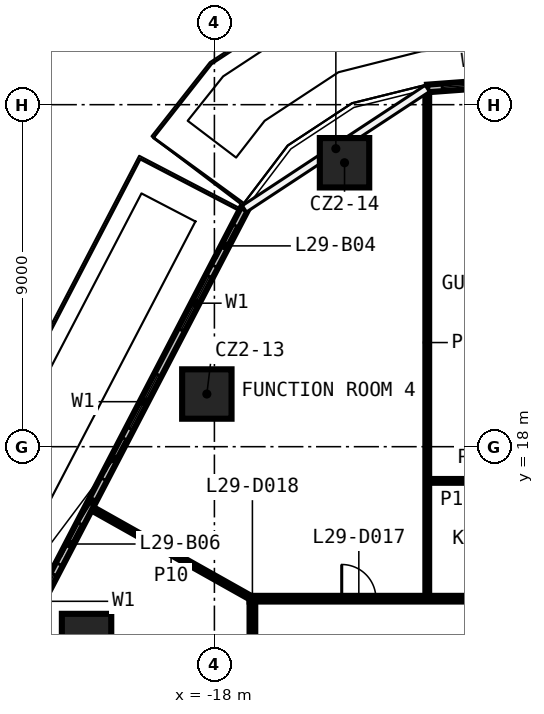
"""IFC4 building model, lengths in metres.
Left out: names, types, materials, properties, quantities, classifications, styles, units other than length and angle.
Written with IfcOpenShell. Run it as: python <this file> out.ifc"""

import sys

from ifc_helpers import new_model, si_unit, direction, frame, frame_2d, origin, origin_2d, place, context, subcontext, project, spatial, rectangle, extrude, element, fill, save


model = new_model("IFC4")
c1 = context("Model", 3, precision=1e-05, world=origin(), true_north=direction((0.0, 1.0)))
c2 = subcontext(c1, "Body", "Model", "MODEL_VIEW")
j1 = project(units=[si_unit("LENGTHUNIT", "METRE"), si_unit("PLANEANGLEUNIT", "RADIAN")], contexts=[c1])
p1 = place(None, origin())
s1 = spatial("IfcSite", under=j1, at=p1, CompositionType="ELEMENT")
p2 = place(p1, origin())
s2 = spatial("IfcBuilding", under=s1, at=p2, CompositionType="ELEMENT")
p3 = place(p2, frame((0.0, 0.0, 132.2)))
s3 = spatial("IfcBuildingStorey", under=s2, at=p3, CompositionType="ELEMENT", Elevation=132.2)
for number, where, z_axis, x_axis in (
    (1, (-21.364, 12.952, 0.0), (0.0, 0.0, 1.0), (1.0, 0.0, 0.0)),
    (2, (-18.199, 19.386, 0.0), (0.0, 0.0, 1.0), (1.0, 0.0, 0.0)),
    (3, (-14.576, 25.472, 0.0), (0.0, 0.0, 1.0), (1.0, 0.0, 0.0)),
):
    element("IfcColumn", number, at=place(p3, frame(where, z_axis=z_axis, x_axis=x_axis)), inside=s3, PredefinedType="COLUMN", context=c2, shape_type="SweptSolid", body=[
        extrude(rectangle(XDim=1.3, YDim=1.3, at=origin_2d()), origin(), (0.0, 0.0, 1.0), 3.3),
    ])
p4 = place(p3, frame((-17.075, 14.0, 0.0), z_axis=(0.0, 0.0, 1.0), x_axis=(1.0, 0.0, 0.0)))
e4 = element("IfcWall", 4, at=p4, inside=s3, PredefinedType="PARTITIONING", context=c2, shape_type="SweptSolid", body=[
    extrude(rectangle(XDim=34.15, YDim=0.15, at=frame_2d((17.075, 0.0))), origin(), (0.0, 0.0, 1.0), 3.3),
])
p5 = place(p4, frame((10.954, 0.0, 0.0)))
e5 = element("IfcOpeningElement", 5, at=p5, cuts=e4, PredefinedType="OPENING", context=c2, shape_type="SweptSolid", body=[
    extrude(rectangle(XDim=0.9, YDim=2.1, at=frame_2d((0.45, 1.05))), frame((0.0, 0.085, 0.0), z_axis=(0.0, -1.0, 0.0), x_axis=(1.0, 0.0, 0.0)), (0.0, 0.0, 1.0), 0.17),
])
p6 = place(p4, frame((7.617, 0.0, 0.0)))
e6 = element("IfcOpeningElement", 6, at=p6, cuts=e4, PredefinedType="OPENING", context=c2, shape_type="SweptSolid", body=[
    extrude(rectangle(XDim=1.0, YDim=2.1, at=frame_2d((0.5, 1.05))), frame((0.0, 0.085, 0.0), z_axis=(0.0, -1.0, 0.0), x_axis=(1.0, 0.0, 0.0)), (0.0, 0.0, 1.0), 0.17),
])
p7 = place(p4, frame((2.425, 0.0, 0.0)))
e7 = element("IfcOpeningElement", 7, at=p7, cuts=e4, PredefinedType="OPENING", context=c2, shape_type="SweptSolid", body=[
    extrude(rectangle(XDim=0.9, YDim=2.1, at=frame_2d((0.45, 1.05))), frame((0.0, 0.085, 0.0), z_axis=(0.0, -1.0, 0.0), x_axis=(1.0, 0.0, 0.0)), (0.0, 0.0, 1.0), 0.17),
])
p8 = place(p3, frame((-12.349, 17.1, 0.0), z_axis=(0.0, 0.0, 1.0), x_axis=(1.0, 0.0, 0.0)))
e8 = element("IfcWall", 8, at=p8, inside=s3, PredefinedType="PARTITIONING", context=c2, shape_type="SweptSolid", body=[
    extrude(rectangle(XDim=2.4, YDim=0.1, at=frame_2d((1.2, 0.0))), origin(), (0.0, 0.0, 1.0), 3.3),
])
p9 = place(p3, frame((-12.399, 14.075, 0.0), z_axis=(0.0, 0.0, 1.0), x_axis=(0.0, 1.0, 0.0)))
e9 = element("IfcWall", 9, at=p9, inside=s3, PredefinedType="PARTITIONING", context=c2, shape_type="SweptSolid", body=[
    extrude(rectangle(XDim=13.331, YDim=0.1, at=frame_2d((6.666, 0.0))), origin(), (0.0, 0.0, 1.0), 3.3),
])
p10 = place(p3, frame((-17.0, -13.925, 0.0), z_axis=(0.0, 0.0, 1.0), x_axis=(0.0, 1.0, 0.0)))
e10 = element("IfcWall", 10, at=p10, inside=s3, PredefinedType="PARTITIONING", context=c2, shape_type="SweptSolid", body=[
    extrude(rectangle(XDim=27.85, YDim=0.15, at=frame_2d((13.925, 0.0))), origin(), (0.0, 0.0, 1.0), 3.3),
])
p11 = place(p10, frame((11.107, 0.0, 0.0)))
e11 = element("IfcOpeningElement", 11, at=p11, cuts=e10, PredefinedType="OPENING", context=c2, shape_type="SweptSolid", body=[
    extrude(rectangle(XDim=0.9, YDim=2.1, at=frame_2d((0.45, 1.05))), frame((0.0, 0.085, 0.0), z_axis=(0.0, -1.0, 0.0), x_axis=(1.0, 0.0, 0.0)), (0.0, 0.0, 1.0), 0.17),
])
p12 = place(p10, frame((25.204, 0.0, 0.0)))
e12 = element("IfcOpeningElement", 12, at=p12, cuts=e10, PredefinedType="OPENING", context=c2, shape_type="SweptSolid", body=[
    extrude(rectangle(XDim=0.9, YDim=2.1, at=frame_2d((0.45, 1.05))), frame((0.0, 0.085, 0.0), z_axis=(0.0, -1.0, 0.0), x_axis=(1.0, 0.0, 0.0)), (0.0, 0.0, 1.0), 0.17),
])
p13 = place(p10, frame((18.833, 0.0, 0.0)))
e13 = element("IfcOpeningElement", 13, at=p13, cuts=e10, PredefinedType="OPENING", context=c2, shape_type="SweptSolid", body=[
    extrude(rectangle(XDim=1.0, YDim=2.1, at=frame_2d((0.5, 1.05))), frame((0.0, 0.085, 0.0), z_axis=(0.0, -1.0, 0.0), x_axis=(1.0, 0.0, 0.0)), (0.0, 0.0, 1.0), 0.17),
])
p14 = place(p10, frame((17.31, 0.0, 0.0)))
e14 = element("IfcOpeningElement", 14, at=p14, cuts=e10, PredefinedType="OPENING", context=c2, shape_type="SweptSolid", body=[
    extrude(rectangle(XDim=1.0, YDim=2.1, at=frame_2d((0.5, 1.05))), frame((0.0, 0.085, 0.0), z_axis=(0.0, -1.0, 0.0), x_axis=(1.0, 0.0, 0.0)), (0.0, 0.0, 1.0), 0.17),
])
p15 = place(p3, frame((-21.279, 16.405, 0.0), z_axis=(0.0, 0.0, 1.0), x_axis=(0.871729599924, -0.489987249443, 0.0)))
e15 = element("IfcWall", 15, at=p15, inside=s3, PredefinedType="PARTITIONING", context=c2, shape_type="SweptSolid", body=[
    extrude(rectangle(XDim=4.908, YDim=0.1, at=frame_2d((2.454, 0.0))), origin(), (0.0, 0.0, 1.0), 3.3),
])
p16 = place(p3, frame((-7.917, 27.757, 0.0), z_axis=(0.0, 0.0, 1.0), x_axis=(-0.997291417846, -0.073551532206, 0.0)))
e16 = element("IfcWall", 16, at=p16, inside=s3, PredefinedType="SOLIDWALL", context=c2, shape_type="SweptSolid", body=[
    extrude(rectangle(XDim=4.494, YDim=0.2, at=frame_2d((2.247, 0.0))), origin(), (0.0, 0.0, 1.0), 3.3),
])
p17 = place(p16, frame((2.5, 0.0, 0.6)))
e17 = element("IfcOpeningElement", 17, at=p17, cuts=e16, PredefinedType="OPENING", context=c2, shape_type="SweptSolid", body=[
    extrude(rectangle(XDim=1.6, YDim=2.4, at=frame_2d((0.8, 1.2))), frame((0.0, 0.11, 0.0), z_axis=(0.0, -1.0, 0.0), x_axis=(1.0, 0.0, 0.0)), (0.0, 0.0, 1.0), 0.22),
])
p18 = place(p16, frame((1.0, 0.0, 0.0)))
e18 = element("IfcOpeningElement", 18, at=p18, cuts=e16, PredefinedType="OPENING", context=c2, shape_type="SweptSolid", body=[
    extrude(rectangle(XDim=1.2, YDim=2.4, at=frame_2d((0.6, 1.2))), frame((0.0, 0.11, 0.0), z_axis=(0.0, -1.0, 0.0), x_axis=(1.0, 0.0, 0.0)), (0.0, 0.0, 1.0), 0.22),
])
p19 = place(p3, frame((-17.21, 24.26, 0.0), z_axis=(0.0, 0.0, 1.0), x_axis=(-0.461902936619, -0.886930480445, 0.0)))
e19 = element("IfcWall", 19, at=p19, inside=s3, PredefinedType="SOLIDWALL", context=c2, shape_type="SweptSolid", body=[
    extrude(rectangle(XDim=22.113, YDim=0.2, at=frame_2d((11.057, 0.0))), origin(), (0.0, 0.0, 1.0), 3.3),
])
p20 = place(p19, frame((2.0, 0.0, 0.6)))
e20 = element("IfcOpeningElement", 20, at=p20, cuts=e19, PredefinedType="OPENING", context=c2, shape_type="SweptSolid", body=[
    extrude(rectangle(XDim=1.6, YDim=2.4, at=frame_2d((0.8, 1.2))), frame((0.0, 0.11, 0.0), z_axis=(0.0, -1.0, 0.0), x_axis=(1.0, 0.0, 0.0)), (0.0, 0.0, 1.0), 0.22),
])
p21 = place(p19, frame((0.5, 0.0, 0.0)))
e21 = element("IfcOpeningElement", 21, at=p21, cuts=e19, PredefinedType="OPENING", context=c2, shape_type="SweptSolid", body=[
    extrude(rectangle(XDim=1.2, YDim=2.4, at=frame_2d((0.6, 1.2))), frame((0.0, 0.11, 0.0), z_axis=(0.0, -1.0, 0.0), x_axis=(1.0, 0.0, 0.0)), (0.0, 0.0, 1.0), 0.22),
])
p22 = place(p19, frame((4.923, 0.0, 0.6)))
e22 = element("IfcOpeningElement", 22, at=p22, cuts=e19, PredefinedType="OPENING", context=c2, shape_type="SweptSolid", body=[
    extrude(rectangle(XDim=1.6, YDim=2.4, at=frame_2d((0.8, 1.2))), frame((0.0, 0.11, 0.0), z_axis=(0.0, -1.0, 0.0), x_axis=(1.0, 0.0, 0.0)), (0.0, 0.0, 1.0), 0.22),
])
p23 = place(p19, frame((6.823, 0.0, 0.0)))
e23 = element("IfcOpeningElement", 23, at=p23, cuts=e19, PredefinedType="OPENING", context=c2, shape_type="SweptSolid", body=[
    extrude(rectangle(XDim=1.2, YDim=2.4, at=frame_2d((0.6, 1.2))), frame((0.0, 0.11, 0.0), z_axis=(0.0, -1.0, 0.0), x_axis=(1.0, 0.0, 0.0)), (0.0, 0.0, 1.0), 0.22),
])
p24 = place(p19, frame((10.845, 0.0, 0.6)))
e24 = element("IfcOpeningElement", 24, at=p24, cuts=e19, PredefinedType="OPENING", context=c2, shape_type="SweptSolid", body=[
    extrude(rectangle(XDim=1.6, YDim=2.4, at=frame_2d((0.8, 1.2))), frame((0.0, 0.11, 0.0), z_axis=(0.0, -1.0, 0.0), x_axis=(1.0, 0.0, 0.0)), (0.0, 0.0, 1.0), 0.22),
])
p25 = place(p19, frame((9.345, 0.0, 0.0)))
e25 = element("IfcOpeningElement", 25, at=p25, cuts=e19, PredefinedType="OPENING", context=c2, shape_type="SweptSolid", body=[
    extrude(rectangle(XDim=1.2, YDim=2.4, at=frame_2d((0.6, 1.2))), frame((0.0, 0.11, 0.0), z_axis=(0.0, -1.0, 0.0), x_axis=(1.0, 0.0, 0.0)), (0.0, 0.0, 1.0), 0.22),
])
p26 = place(p19, frame((15.268, 0.0, 0.6)))
e26 = element("IfcOpeningElement", 26, at=p26, cuts=e19, PredefinedType="OPENING", context=c2, shape_type="SweptSolid", body=[
    extrude(rectangle(XDim=1.6, YDim=2.4, at=frame_2d((0.8, 1.2))), frame((0.0, 0.11, 0.0), z_axis=(0.0, -1.0, 0.0), x_axis=(1.0, 0.0, 0.0)), (0.0, 0.0, 1.0), 0.22),
])
p27 = place(p19, frame((13.768, 0.0, 0.0)))
e27 = element("IfcOpeningElement", 27, at=p27, cuts=e19, PredefinedType="OPENING", context=c2, shape_type="SweptSolid", body=[
    extrude(rectangle(XDim=1.2, YDim=2.4, at=frame_2d((0.6, 1.2))), frame((0.0, 0.11, 0.0), z_axis=(0.0, -1.0, 0.0), x_axis=(1.0, 0.0, 0.0)), (0.0, 0.0, 1.0), 0.22),
])
p28 = place(p19, frame((18.19, 0.0, 0.6)))
e28 = element("IfcOpeningElement", 28, at=p28, cuts=e19, PredefinedType="OPENING", context=c2, shape_type="SweptSolid", body=[
    extrude(rectangle(XDim=1.6, YDim=2.4, at=frame_2d((0.8, 1.2))), frame((0.0, 0.11, 0.0), z_axis=(0.0, -1.0, 0.0), x_axis=(1.0, 0.0, 0.0)), (0.0, 0.0, 1.0), 0.22),
])
p29 = place(p19, frame((20.09, 0.0, 0.0)))
e29 = element("IfcOpeningElement", 29, at=p29, cuts=e19, PredefinedType="OPENING", context=c2, shape_type="SweptSolid", body=[
    extrude(rectangle(XDim=1.2, YDim=2.4, at=frame_2d((0.6, 1.2))), frame((0.0, 0.11, 0.0), z_axis=(0.0, -1.0, 0.0), x_axis=(1.0, 0.0, 0.0)), (0.0, 0.0, 1.0), 0.22),
])
p30 = place(p7, origin())
e30 = element("IfcDoor", 30, at=p30, inside=s3, OperationType="SINGLE_SWING_RIGHT", PredefinedType="DOOR", context=c2, shape_type="SweptSolid", body=[
    extrude(rectangle(XDim=0.9, YDim=2.1, at=frame_2d((0.45, 1.05))), frame((0.0, 0.025, 0.0), z_axis=(0.0, -1.0, 0.0), x_axis=(1.0, 0.0, 0.0)), (0.0, 0.0, 1.0), 0.05),
])
fill(e7, e30)
p31 = place(p17, origin())
e31 = element("IfcWindow", 31, at=p31, inside=s3, PartitioningType="SINGLE_PANEL", PredefinedType="WINDOW", context=c2, shape_type="SweptSolid", body=[
    extrude(rectangle(XDim=1.6, YDim=2.4, at=frame_2d((0.8, 1.2))), frame((0.0, 0.03, 0.0), z_axis=(0.0, -1.0, 0.0), x_axis=(1.0, 0.0, 0.0)), (0.0, 0.0, 1.0), 0.06),
])
fill(e17, e31)
p32 = place(p20, origin())
e32 = element("IfcWindow", 32, at=p32, inside=s3, PartitioningType="SINGLE_PANEL", PredefinedType="WINDOW", context=c2, shape_type="SweptSolid", body=[
    extrude(rectangle(XDim=1.6, YDim=2.4, at=frame_2d((0.8, 1.2))), frame((0.0, 0.03, 0.0), z_axis=(0.0, -1.0, 0.0), x_axis=(1.0, 0.0, 0.0)), (0.0, 0.0, 1.0), 0.06),
])
fill(e20, e32)
p33 = place(p21, origin())
e33 = element("IfcDoor", 33, at=p33, inside=s3, OperationType="SLIDING_TO_LEFT", PredefinedType="DOOR", context=c2, shape_type="SweptSolid", body=[
    extrude(rectangle(XDim=1.2, YDim=2.4, at=frame_2d((0.6, 1.2))), frame((0.0, 0.025, 0.0), z_axis=(0.0, -1.0, 0.0), x_axis=(1.0, 0.0, 0.0)), (0.0, 0.0, 1.0), 0.05),
])
fill(e21, e33)
p34 = place(p22, origin())
e34 = element("IfcWindow", 34, at=p34, inside=s3, PartitioningType="SINGLE_PANEL", PredefinedType="WINDOW", context=c2, shape_type="SweptSolid", body=[
    extrude(rectangle(XDim=1.6, YDim=2.4, at=frame_2d((0.8, 1.2))), frame((0.0, 0.03, 0.0), z_axis=(0.0, -1.0, 0.0), x_axis=(1.0, 0.0, 0.0)), (0.0, 0.0, 1.0), 0.06),
])
fill(e22, e34)
p35 = place(p23, origin())
e35 = element("IfcDoor", 35, at=p35, inside=s3, OperationType="SLIDING_TO_LEFT", PredefinedType="DOOR", context=c2, shape_type="SweptSolid", body=[
    extrude(rectangle(XDim=1.2, YDim=2.4, at=frame_2d((0.6, 1.2))), frame((0.0, 0.025, 0.0), z_axis=(0.0, -1.0, 0.0), x_axis=(1.0, 0.0, 0.0)), (0.0, 0.0, 1.0), 0.05),
])
fill(e23, e35)
p36 = place(p24, origin())
e36 = element("IfcWindow", 36, at=p36, inside=s3, PartitioningType="SINGLE_PANEL", PredefinedType="WINDOW", context=c2, shape_type="SweptSolid", body=[
    extrude(rectangle(XDim=1.6, YDim=2.4, at=frame_2d((0.8, 1.2))), frame((0.0, 0.03, 0.0), z_axis=(0.0, -1.0, 0.0), x_axis=(1.0, 0.0, 0.0)), (0.0, 0.0, 1.0), 0.06),
])
fill(e24, e36)
p37 = place(p25, origin())
e37 = element("IfcDoor", 37, at=p37, inside=s3, OperationType="SLIDING_TO_LEFT", PredefinedType="DOOR", context=c2, shape_type="SweptSolid", body=[
    extrude(rectangle(XDim=1.2, YDim=2.4, at=frame_2d((0.6, 1.2))), frame((0.0, 0.025, 0.0), z_axis=(0.0, -1.0, 0.0), x_axis=(1.0, 0.0, 0.0)), (0.0, 0.0, 1.0), 0.05),
])
fill(e25, e37)
save(model, sys.argv[1])
